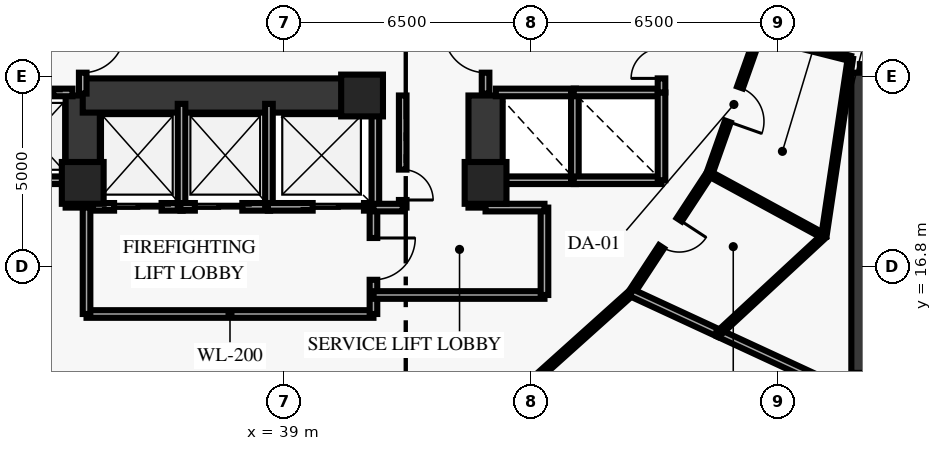
"""IFC4 building model, lengths in metres.
Left out: names, types, materials, properties, quantities, classifications, styles, units other than length and angle.
Written with IfcOpenShell. Run it as: python <this file> out.ifc"""

import sys

from ifc_helpers import new_model, si_unit, direction, frame, frame_2d, origin, origin_2d, place, context, subcontext, project, spatial, rectangle, extrude, element, fill, save


model = new_model("IFC4")
c1 = context("Model", 3, precision=1e-05, world=origin(), true_north=direction((0.0, 1.0)))
c2 = subcontext(c1, "Body", "Model", "MODEL_VIEW")
j1 = project(units=[si_unit("LENGTHUNIT", "METRE"), si_unit("PLANEANGLEUNIT", "RADIAN")], contexts=[c1])
p1 = place(None, origin())
s1 = spatial("IfcSite", under=j1, at=p1, CompositionType="ELEMENT")
p2 = place(p1, origin())
s2 = spatial("IfcBuilding", under=s1, at=p2, CompositionType="ELEMENT")
p3 = place(p2, frame((0.0, 0.0, 6.0)))
s3 = spatial("IfcBuildingStorey", under=s2, at=p3, CompositionType="ELEMENT", Elevation=6.0)
for number, where, z_axis, x_axis in (
    (1, (33.7, 19.0, 0.0), (0.0, 0.0, 1.0), (1.0, 0.0, 0.0)),
    (2, (41.05, 21.3, 0.0), (0.0, 0.0, 1.0), (1.0, 0.0, 0.0)),
    (3, (44.3, 19.0, 0.0), (0.0, 0.0, 1.0), (1.0, 0.0, 0.0)),
):
    element("IfcColumn", number, at=place(p3, frame(where, z_axis=z_axis, x_axis=x_axis)), inside=s3, PredefinedType="PILASTER", context=c2, shape_type="SweptSolid", body=[
        extrude(rectangle(XDim=1.1, YDim=1.1, at=origin_2d()), origin(), (0.0, 0.0, 1.0), 4.7),
    ])
for number, where, z_axis, x_axis in (
    (4, (33.7, 18.35, 0.0), (0.0, 0.0, 1.0), (0.0, 1.0, 0.0)),
    (5, (44.3, 18.35, 0.0), (0.0, 0.0, 1.0), (0.0, 1.0, 0.0)),
):
    element("IfcWall", number, at=place(p3, frame(where, z_axis=z_axis, x_axis=x_axis)), inside=s3, PredefinedType="SHEAR", context=c2, shape_type="SweptSolid", body=[
        extrude(rectangle(XDim=2.95, YDim=0.9, at=frame_2d((1.475, 0.0))), origin(), (0.0, 0.0, 1.0), 4.7),
    ])
p4 = place(p3, frame((33.7, 21.3, 0.0), z_axis=(0.0, 0.0, 1.0), x_axis=(1.0, 0.0, 0.0)))
e6 = element("IfcWall", 6, at=p4, inside=s3, PredefinedType="SHEAR", context=c2, shape_type="SweptSolid", body=[
    extrude(rectangle(XDim=7.55, YDim=0.9, at=frame_2d((3.775, 0.0))), origin(), (0.0, 0.0, 1.0), 4.7),
])
p5 = place(p3, frame((54.15, 14.0, 0.0), z_axis=(0.0, 0.0, 1.0), x_axis=(1.0, 0.0, 0.0)))
e7 = element("IfcWall", 7, at=p5, inside=s3, PredefinedType="SHEAR", context=c2, shape_type="SweptSolid", body=[
    extrude(rectangle(XDim=4.4, YDim=0.45, at=frame_2d((2.2, 0.0))), origin(), (0.0, 0.0, 1.0), 4.7),
])
p6 = place(p3, frame((58.55, 21.9, 0.0), z_axis=(0.0, 0.0, 1.0), x_axis=(-1.0, 0.0, 0.0)))
e8 = element("IfcWall", 8, at=p6, inside=s3, PredefinedType="SHEAR", context=c2, shape_type="SweptSolid", body=[
    extrude(rectangle(XDim=4.4, YDim=0.45, at=frame_2d((2.2, 0.0))), origin(), (0.0, 0.0, 1.0), 4.7),
])
p7 = place(p6, frame((1.625, 0.0, 0.0)))
e9 = element("IfcOpeningElement", 9, at=p7, cuts=e8, PredefinedType="OPENING", context=c2, shape_type="SweptSolid", body=[
    extrude(rectangle(XDim=1.15, YDim=2.15, at=frame_2d((0.575, 1.075))), frame((0.0, 0.235, 0.0), z_axis=(0.0, -1.0, 0.0), x_axis=(1.0, 0.0, 0.0)), (0.0, 0.0, 1.0), 0.47),
])
p8 = place(p3, frame((54.15, 14.0, 0.0), z_axis=(0.0, 0.0, 1.0), x_axis=(0.0, 1.0, 0.0)))
e10 = element("IfcWall", 10, at=p8, inside=s3, PredefinedType="SHEAR", context=c2, shape_type="SweptSolid", body=[
    extrude(rectangle(XDim=7.9, YDim=0.45, at=frame_2d((3.95, 0.0))), origin(), (0.0, 0.0, 1.0), 4.7),
])
p9 = place(p3, frame((31.32, 19.07, 0.0), z_axis=(0.0, 0.0, 1.0), x_axis=(1.0, 0.0, 0.0)))
e11 = element("IfcWall", 11, at=p9, inside=s3, PredefinedType="SOLIDWALL", context=c2, shape_type="SweptSolid", body=[
    extrude(rectangle(XDim=2.11, YDim=0.2, at=frame_2d((1.055, 0.0))), origin(), (0.0, 0.0, 1.0), 4.7),
])
p10 = place(p3, frame((31.32, 21.38, 0.0), z_axis=(0.0, 0.0, 1.0), x_axis=(1.0, 0.0, 0.0)))
e12 = element("IfcWall", 12, at=p10, inside=s3, PredefinedType="SOLIDWALL", context=c2, shape_type="SweptSolid", body=[
    extrude(rectangle(XDim=2.11, YDim=0.2, at=frame_2d((1.055, 0.0))), origin(), (0.0, 0.0, 1.0), 4.7),
])
p11 = place(p10, frame((0.505, 0.0, 0.0)))
e13 = element("IfcOpeningElement", 13, at=p11, cuts=e12, PredefinedType="OPENING", context=c2, shape_type="SweptSolid", body=[
    extrude(rectangle(XDim=1.1, YDim=2.15, at=frame_2d((0.55, 1.075))), frame((0.0, 0.11, 0.0), z_axis=(0.0, -1.0, 0.0), x_axis=(1.0, 0.0, 0.0)), (0.0, 0.0, 1.0), 0.22),
])
for number, where, z_axis, x_axis in (
    (14, (44.57, 19.07, 0.0), (0.0, 0.0, 1.0), (1.0, 0.0, 0.0)),
    (15, (44.57, 21.38, 0.0), (0.0, 0.0, 1.0), (1.0, 0.0, 0.0)),
):
    element("IfcWall", number, at=place(p3, frame(where, z_axis=z_axis, x_axis=x_axis)), inside=s3, PredefinedType="SOLIDWALL", context=c2, shape_type="SweptSolid", body=[
        extrude(rectangle(XDim=2.11, YDim=0.2, at=frame_2d((1.055, 0.0))), origin(), (0.0, 0.0, 1.0), 4.7),
    ])
for number, where, z_axis, x_axis in (
    (16, (46.65, 19.07, 0.0), (0.0, 0.0, 1.0), (0.0, 1.0, 0.0)),
    (17, (46.62, 19.07, 0.0), (0.0, 0.0, 1.0), (1.0, 0.0, 0.0)),
    (18, (46.62, 21.38, 0.0), (0.0, 0.0, 1.0), (1.0, 0.0, 0.0)),
    (19, (48.93, 19.07, 0.0), (0.0, 0.0, 1.0), (0.0, 1.0, 0.0)),
):
    element("IfcWall", number, at=place(p3, frame(where, z_axis=z_axis, x_axis=x_axis)), inside=s3, PredefinedType="SOLIDWALL", context=c2, shape_type="SweptSolid", body=[
        extrude(rectangle(XDim=2.31, YDim=0.2, at=frame_2d((1.155, 0.0))), origin(), (0.0, 0.0, 1.0), 4.7),
    ])
p12 = place(p3, frame((33.97, 18.37, 0.0), z_axis=(0.0, 0.0, 1.0), x_axis=(1.0, 0.0, 0.0)))
e20 = element("IfcWall", 20, at=p12, inside=s3, PredefinedType="SOLIDWALL", context=c2, shape_type="SweptSolid", body=[
    extrude(rectangle(XDim=2.36, YDim=0.2, at=frame_2d((1.18, 0.0))), origin(), (0.0, 0.0, 1.0), 4.7),
])
p13 = place(p12, frame((0.555, 0.0, 0.0)))
e21 = element("IfcOpeningElement", 21, at=p13, cuts=e20, PredefinedType="OPENING", context=c2, shape_type="SweptSolid", body=[
    extrude(rectangle(XDim=1.25, YDim=2.2, at=frame_2d((0.625, 1.1))), frame((0.0, 0.11, 0.0), z_axis=(0.0, -1.0, 0.0), x_axis=(1.0, 0.0, 0.0)), (0.0, 0.0, 1.0), 0.22),
])
p14 = place(p3, frame((36.3, 18.37, 0.0), z_axis=(0.0, 0.0, 1.0), x_axis=(0.0, 1.0, 0.0)))
e22 = element("IfcWall", 22, at=p14, inside=s3, PredefinedType="SOLIDWALL", context=c2, shape_type="SweptSolid", body=[
    extrude(rectangle(XDim=2.71, YDim=0.2, at=frame_2d((1.355, 0.0))), origin(), (0.0, 0.0, 1.0), 4.7),
])
p15 = place(p3, frame((36.27, 18.37, 0.0), z_axis=(0.0, 0.0, 1.0), x_axis=(1.0, 0.0, 0.0)))
e23 = element("IfcWall", 23, at=p15, inside=s3, PredefinedType="SOLIDWALL", context=c2, shape_type="SweptSolid", body=[
    extrude(rectangle(XDim=2.36, YDim=0.2, at=frame_2d((1.18, 0.0))), origin(), (0.0, 0.0, 1.0), 4.7),
])
p16 = place(p15, frame((0.38, 0.0, 0.0)))
e24 = element("IfcOpeningElement", 24, at=p16, cuts=e23, PredefinedType="OPENING", context=c2, shape_type="SweptSolid", body=[
    extrude(rectangle(XDim=1.25, YDim=2.2, at=frame_2d((0.625, 1.1))), frame((0.0, 0.11, 0.0), z_axis=(0.0, -1.0, 0.0), x_axis=(1.0, 0.0, 0.0)), (0.0, 0.0, 1.0), 0.22),
])
p17 = place(p3, frame((38.6, 18.37, 0.0), z_axis=(0.0, 0.0, 1.0), x_axis=(0.0, 1.0, 0.0)))
e25 = element("IfcWall", 25, at=p17, inside=s3, PredefinedType="SOLIDWALL", context=c2, shape_type="SweptSolid", body=[
    extrude(rectangle(XDim=2.71, YDim=0.2, at=frame_2d((1.355, 0.0))), origin(), (0.0, 0.0, 1.0), 4.7),
])
p18 = place(p3, frame((38.57, 18.37, 0.0), z_axis=(0.0, 0.0, 1.0), x_axis=(1.0, 0.0, 0.0)))
e26 = element("IfcWall", 26, at=p18, inside=s3, PredefinedType="SOLIDWALL", context=c2, shape_type="SweptSolid", body=[
    extrude(rectangle(XDim=2.83, YDim=0.2, at=frame_2d((1.415, 0.0))), origin(), (0.0, 0.0, 1.0), 4.7),
])
p19 = place(p18, frame((1.18, 0.0, 0.0)))
e27 = element("IfcOpeningElement", 27, at=p19, cuts=e26, PredefinedType="OPENING", context=c2, shape_type="SweptSolid", body=[
    extrude(rectangle(XDim=1.35, YDim=2.18, at=frame_2d((0.675, 1.09))), frame((0.0, 0.11, 0.0), z_axis=(0.0, -1.0, 0.0), x_axis=(1.0, 0.0, 0.0)), (0.0, 0.0, 1.0), 0.22),
])
p20 = place(p3, frame((41.4, 18.37, 0.0), z_axis=(0.0, 0.0, 1.0), x_axis=(0.0, 1.0, 0.0)))
e28 = element("IfcWall", 28, at=p20, inside=s3, PredefinedType="SOLIDWALL", context=c2, shape_type="SweptSolid", body=[
    extrude(rectangle(XDim=2.71, YDim=0.2, at=frame_2d((1.355, 0.0))), origin(), (0.0, 0.0, 1.0), 4.7),
])
p21 = place(p3, frame((48.93, 21.38, 0.0), z_axis=(0.0, 0.0, 1.0), x_axis=(0.0, 1.0, 0.0)))
e29 = element("IfcWall", 29, at=p21, inside=s3, PredefinedType="SOLIDWALL", context=c2, shape_type="SweptSolid", body=[
    extrude(rectangle(XDim=2.34, YDim=0.2, at=frame_2d((1.17, 0.0))), origin(), (0.0, 0.0, 1.0), 4.7),
])
p22 = place(p21, frame((0.37, 0.0, 0.0)))
e30 = element("IfcOpeningElement", 30, at=p22, cuts=e29, PredefinedType="OPENING", context=c2, shape_type="SweptSolid", body=[
    extrude(rectangle(XDim=1.6, YDim=2.2, at=frame_2d((0.8, 1.1))), frame((0.0, 0.11, 0.0), z_axis=(0.0, -1.0, 0.0), x_axis=(1.0, 0.0, 0.0)), (0.0, 0.0, 1.0), 0.22),
])
p23 = place(p3, frame((33.7, 21.35, 0.0), z_axis=(0.0, 0.0, 1.0), x_axis=(0.0, 1.0, 0.0)))
e31 = element("IfcWall", 31, at=p23, inside=s3, PredefinedType="SOLIDWALL", context=c2, shape_type="SweptSolid", body=[
    extrude(rectangle(XDim=2.1, YDim=0.2, at=frame_2d((1.05, 0.0))), origin(), (0.0, 0.0, 1.0), 3.92),
])
p24 = place(p23, frame((0.55, 0.0, 0.0)))
e32 = element("IfcOpeningElement", 32, at=p24, cuts=e31, PredefinedType="OPENING", context=c2, shape_type="SweptSolid", body=[
    extrude(rectangle(XDim=1.1, YDim=2.15, at=frame_2d((0.55, 1.075))), frame((0.0, 0.11, 0.0), z_axis=(0.0, -1.0, 0.0), x_axis=(1.0, 0.0, 0.0)), (0.0, 0.0, 1.0), 0.22),
])
p25 = place(p3, frame((44.3, 21.35, 0.0), z_axis=(0.0, 0.0, 1.0), x_axis=(0.0, 1.0, 0.0)))
e33 = element("IfcWall", 33, at=p25, inside=s3, PredefinedType="SOLIDWALL", context=c2, shape_type="SweptSolid", body=[
    extrude(rectangle(XDim=2.1, YDim=0.2, at=frame_2d((1.05, 0.0))), origin(), (0.0, 0.0, 1.0), 3.92),
])
p26 = place(p25, frame((0.55, 0.0, 0.0)))
e34 = element("IfcOpeningElement", 34, at=p26, cuts=e33, PredefinedType="OPENING", context=c2, shape_type="SweptSolid", body=[
    extrude(rectangle(XDim=1.1, YDim=2.15, at=frame_2d((0.55, 1.075))), frame((0.0, 0.11, 0.0), z_axis=(0.0, -1.0, 0.0), x_axis=(1.0, 0.0, 0.0)), (0.0, 0.0, 1.0), 0.22),
])
p27 = place(p3, frame((33.8, 15.55, 0.0), z_axis=(0.0, 0.0, 1.0), x_axis=(1.0, 0.0, 0.0)))
e35 = element("IfcWall", 35, at=p27, inside=s3, PredefinedType="SOLIDWALL", context=c2, shape_type="SweptSolid", body=[
    extrude(rectangle(XDim=7.55, YDim=0.2, at=frame_2d((3.775, 0.0))), origin(), (0.0, 0.0, 1.0), 4.7),
])
p28 = place(p3, frame((33.8, 15.55, 0.0), z_axis=(0.0, 0.0, 1.0), x_axis=(0.0, 1.0, 0.0)))
e36 = element("IfcWall", 36, at=p28, inside=s3, PredefinedType="SOLIDWALL", context=c2, shape_type="SweptSolid", body=[
    extrude(rectangle(XDim=2.8, YDim=0.2, at=frame_2d((1.4, 0.0))), origin(), (0.0, 0.0, 1.0), 4.7),
])
p29 = place(p3, frame((41.35, 15.55, 0.0), z_axis=(0.0, 0.0, 1.0), x_axis=(0.0, 1.0, 0.0)))
e37 = element("IfcWall", 37, at=p29, inside=s3, PredefinedType="SOLIDWALL", context=c2, shape_type="SweptSolid", body=[
    extrude(rectangle(XDim=2.8, YDim=0.2, at=frame_2d((1.4, 0.0))), origin(), (0.0, 0.0, 1.0), 4.7),
])
p30 = place(p29, frame((0.9, 0.0, 0.0)))
e38 = element("IfcOpeningElement", 38, at=p30, cuts=e37, PredefinedType="OPENING", context=c2, shape_type="SweptSolid", body=[
    extrude(rectangle(XDim=1.1, YDim=2.15, at=frame_2d((0.55, 1.075))), frame((0.0, 0.11, 0.0), z_axis=(0.0, -1.0, 0.0), x_axis=(1.0, 0.0, 0.0)), (0.0, 0.0, 1.0), 0.22),
])
p31 = place(p3, frame((41.35, 16.05, 0.0), z_axis=(0.0, 0.0, 1.0), x_axis=(1.0, 0.0, 0.0)))
e39 = element("IfcWall", 39, at=p31, inside=s3, PredefinedType="SOLIDWALL", context=c2, shape_type="SweptSolid", body=[
    extrude(rectangle(XDim=4.5, YDim=0.2, at=frame_2d((2.25, 0.0))), origin(), (0.0, 0.0, 1.0), 4.7),
])
p32 = place(p3, frame((45.85, 16.05, 0.0), z_axis=(0.0, 0.0, 1.0), x_axis=(0.0, 1.0, 0.0)))
e40 = element("IfcWall", 40, at=p32, inside=s3, PredefinedType="SOLIDWALL", context=c2, shape_type="SweptSolid", body=[
    extrude(rectangle(XDim=2.3, YDim=0.2, at=frame_2d((1.15, 0.0))), origin(), (0.0, 0.0, 1.0), 4.7),
])
p33 = place(p3, frame((44.3, 18.35, 0.0), z_axis=(0.0, 0.0, 1.0), x_axis=(1.0, 0.0, 0.0)))
e41 = element("IfcWall", 41, at=p33, inside=s3, PredefinedType="SOLIDWALL", context=c2, shape_type="SweptSolid", body=[
    extrude(rectangle(XDim=1.55, YDim=0.2, at=frame_2d((0.775, 0.0))), origin(), (0.0, 0.0, 1.0), 4.7),
])
p34 = place(p3, frame((42.12, 18.35, 0.0), z_axis=(0.0, 0.0, 1.0), x_axis=(0.0, 1.0, 0.0)))
e42 = element("IfcWall", 42, at=p34, inside=s3, PredefinedType="SOLIDWALL", context=c2, shape_type="SweptSolid", body=[
    extrude(rectangle(XDim=2.95, YDim=0.2, at=frame_2d((1.475, 0.0))), origin(), (0.0, 0.0, 1.0), 4.7),
])
p35 = place(p34, frame((0.2, 0.0, 0.0)))
e43 = element("IfcOpeningElement", 43, at=p35, cuts=e42, PredefinedType="OPENING", context=c2, shape_type="SweptSolid", body=[
    extrude(rectangle(XDim=0.8, YDim=2.05, at=frame_2d((0.4, 1.025))), frame((0.0, 0.11, 0.0), z_axis=(0.0, -1.0, 0.0), x_axis=(1.0, 0.0, 0.0)), (0.0, 0.0, 1.0), 0.22),
])
p36 = place(p3, frame((41.35, 18.35, 0.0), z_axis=(0.0, 0.0, 1.0), x_axis=(1.0, 0.0, 0.0)))
e44 = element("IfcWall", 44, at=p36, inside=s3, PredefinedType="SOLIDWALL", context=c2, shape_type="SweptSolid", body=[
    extrude(rectangle(XDim=0.77, YDim=0.2, at=frame_2d((0.385, 0.0))), origin(), (0.0, 0.0, 1.0), 4.7),
])
p37 = place(p3, frame((45.46, 13.706, 0.0), z_axis=(0.0, 0.0, 1.0), x_axis=(0.744066617248, 0.668105432621, 0.0)))
e45 = element("IfcWall", 45, at=p37, inside=s3, PredefinedType="PARTITIONING", context=c2, shape_type="SweptSolid", body=[
    extrude(rectangle(XDim=3.596, YDim=0.16, at=frame_2d((1.798, 0.0))), origin(), (0.0, 0.0, 1.0), 4.7),
])
p38 = place(p3, frame((50.189, 19.24, 0.0), z_axis=(0.0, 0.0, 1.0), x_axis=(-0.548318837904, -0.836269365694, 0.0)))
e46 = element("IfcWall", 46, at=p38, inside=s3, PredefinedType="PARTITIONING", context=c2, shape_type="SweptSolid", body=[
    extrude(rectangle(XDim=3.744, YDim=0.16, at=frame_2d((1.872, 0.0))), origin(), (0.0, 0.0, 1.0), 4.7),
])
p39 = place(p38, frame((1.447, 0.0, 0.0)))
e47 = element("IfcOpeningElement", 47, at=p39, cuts=e46, PredefinedType="OPENING", context=c2, shape_type="SweptSolid", body=[
    extrude(rectangle(XDim=0.85, YDim=2.1, at=frame_2d((0.425, 1.05))), frame((0.0, 0.09, 0.0), z_axis=(0.0, -1.0, 0.0), x_axis=(1.0, 0.0, 0.0)), (0.0, 0.0, 1.0), 0.18),
])
p40 = place(p3, frame((51.48, 22.887, 0.0), z_axis=(0.0, 0.0, 1.0), x_axis=(-0.333704620558, -0.942677689467, 0.0)))
e48 = element("IfcWall", 48, at=p40, inside=s3, PredefinedType="PARTITIONING", context=c2, shape_type="SweptSolid", body=[
    extrude(rectangle(XDim=3.869, YDim=0.16, at=frame_2d((1.934, 0.0))), origin(), (0.0, 0.0, 1.0), 4.7),
])
p41 = place(p40, frame((1.459, 0.0, 0.0)))
e49 = element("IfcOpeningElement", 49, at=p41, cuts=e48, PredefinedType="OPENING", context=c2, shape_type="SweptSolid", body=[
    extrude(rectangle(XDim=0.95, YDim=2.1, at=frame_2d((0.475, 1.05))), frame((0.0, 0.09, 0.0), z_axis=(0.0, -1.0, 0.0), x_axis=(1.0, 0.0, 0.0)), (0.0, 0.0, 1.0), 0.18),
])
p42 = place(p3, frame((48.136, 16.109, 0.0), z_axis=(0.0, 0.0, 1.0), x_axis=(0.907508335547, -0.420034071133, 0.0)))
e50 = element("IfcWall", 50, at=p42, inside=s3, PredefinedType="PARTITIONING", context=c2, shape_type="SweptSolid", body=[
    extrude(rectangle(XDim=2.538, YDim=0.2, at=frame_2d((1.269, 0.0))), origin(), (0.0, 0.0, 1.0), 4.7),
])
p43 = place(p3, frame((50.439, 15.043, 0.0), z_axis=(0.0, 0.0, 1.0), x_axis=(0.907524397356, -0.419999366908, 0.0)))
e51 = element("IfcWall", 51, at=p43, inside=s3, PredefinedType="PARTITIONING", context=c2, shape_type="SweptSolid", body=[
    extrude(rectangle(XDim=7.614, YDim=0.2, at=frame_2d((3.807, 0.0))), origin(), (0.0, 0.0, 1.0), 4.7),
])
p44 = place(p3, frame((50.189, 19.24, 0.0), z_axis=(0.0, 0.0, 1.0), x_axis=(0.878392721738, -0.477939563541, 0.0)))
e52 = element("IfcWall", 52, at=p44, inside=s3, PredefinedType="PARTITIONING", context=c2, shape_type="SweptSolid", body=[
    extrude(rectangle(XDim=3.431, YDim=0.14, at=frame_2d((1.716, 0.0))), origin(), (0.0, 0.0, 1.0), 4.7),
])
p45 = place(p3, frame((51.48, 22.887, 0.0), z_axis=(0.0, 0.0, 1.0), x_axis=(0.969564374521, -0.244836524357, 0.0)))
e53 = element("IfcWall", 53, at=p45, inside=s3, PredefinedType="PARTITIONING", context=c2, shape_type="SweptSolid", body=[
    extrude(rectangle(XDim=2.496, YDim=0.14, at=frame_2d((1.248, 0.0))), origin(), (0.0, 0.0, 1.0), 4.7),
])
p46 = place(p3, frame((50.439, 15.043, 0.0), z_axis=(0.0, 0.0, 1.0), x_axis=(0.734032370371, 0.679114481695, 0.0)))
e54 = element("IfcWall", 54, at=p46, inside=s3, PredefinedType="PARTITIONING", context=c2, shape_type="SweptSolid", body=[
    extrude(rectangle(XDim=3.765, YDim=0.14, at=frame_2d((1.883, 0.0))), origin(), (0.0, 0.0, 1.0), 4.7),
])
p47 = place(p3, frame((53.203, 17.6, 0.0), z_axis=(0.0, 0.0, 1.0), x_axis=(0.147441370436, 0.989070797407, 0.0)))
e55 = element("IfcWall", 55, at=p47, inside=s3, PredefinedType="PARTITIONING", context=c2, shape_type="SweptSolid", body=[
    extrude(rectangle(XDim=4.728, YDim=0.14, at=frame_2d((2.364, 0.0))), origin(), (0.0, 0.0, 1.0), 4.7),
])
p48 = place(p11, origin())
e56 = element("IfcDoor", 56, at=p48, inside=s3, OperationType="DOUBLE_DOOR_SLIDING", PredefinedType="DOOR", context=c2, shape_type="SweptSolid", body=[
    extrude(rectangle(XDim=1.1, YDim=2.15, at=frame_2d((0.55, 1.075))), frame((0.0, 0.025, 0.0), z_axis=(0.0, -1.0, 0.0), x_axis=(1.0, 0.0, 0.0)), (0.0, 0.0, 1.0), 0.05),
])
fill(e13, e56)
p49 = place(p13, origin())
e57 = element("IfcDoor", 57, at=p49, inside=s3, OperationType="DOUBLE_DOOR_SLIDING", PredefinedType="DOOR", context=c2, shape_type="SweptSolid", body=[
    extrude(rectangle(XDim=1.25, YDim=2.2, at=frame_2d((0.625, 1.1))), frame((0.0, 0.025, 0.0), z_axis=(0.0, -1.0, 0.0), x_axis=(1.0, 0.0, 0.0)), (0.0, 0.0, 1.0), 0.05),
])
fill(e21, e57)
p50 = place(p16, origin())
e58 = element("IfcDoor", 58, at=p50, inside=s3, OperationType="DOUBLE_DOOR_SLIDING", PredefinedType="DOOR", context=c2, shape_type="SweptSolid", body=[
    extrude(rectangle(XDim=1.25, YDim=2.2, at=frame_2d((0.625, 1.1))), frame((0.0, 0.025, 0.0), z_axis=(0.0, -1.0, 0.0), x_axis=(1.0, 0.0, 0.0)), (0.0, 0.0, 1.0), 0.05),
])
fill(e24, e58)
p51 = place(p19, origin())
e59 = element("IfcDoor", 59, at=p51, inside=s3, OperationType="DOUBLE_DOOR_SLIDING", PredefinedType="DOOR", context=c2, shape_type="SweptSolid", body=[
    extrude(rectangle(XDim=1.35, YDim=2.18, at=frame_2d((0.675, 1.09))), frame((0.0, 0.025, 0.0), z_axis=(0.0, -1.0, 0.0), x_axis=(1.0, 0.0, 0.0)), (0.0, 0.0, 1.0), 0.05),
])
fill(e27, e59)
p52 = place(p22, origin())
e60 = element("IfcDoor", 60, at=p52, inside=s3, OperationType="DOUBLE_DOOR_SINGLE_SWING", PredefinedType="DOOR", context=c2, shape_type="SweptSolid", body=[
    extrude(rectangle(XDim=1.6, YDim=2.2, at=frame_2d((0.8, 1.1))), frame((0.0, 0.025, 0.0), z_axis=(0.0, -1.0, 0.0), x_axis=(1.0, 0.0, 0.0)), (0.0, 0.0, 1.0), 0.05),
])
fill(e30, e60)
p53 = place(p24, origin())
e61 = element("IfcDoor", 61, at=p53, inside=s3, OperationType="SINGLE_SWING_RIGHT", PredefinedType="DOOR", context=c2, shape_type="SweptSolid", body=[
    extrude(rectangle(XDim=1.1, YDim=2.15, at=frame_2d((0.55, 1.075))), frame((0.0, 0.025, 0.0), z_axis=(0.0, -1.0, 0.0), x_axis=(1.0, 0.0, 0.0)), (0.0, 0.0, 1.0), 0.05),
])
fill(e32, e61)
p54 = place(p26, origin())
e62 = element("IfcDoor", 62, at=p54, inside=s3, OperationType="SINGLE_SWING_RIGHT", PredefinedType="DOOR", context=c2, shape_type="SweptSolid", body=[
    extrude(rectangle(XDim=1.1, YDim=2.15, at=frame_2d((0.55, 1.075))), frame((0.0, 0.025, 0.0), z_axis=(0.0, -1.0, 0.0), x_axis=(1.0, 0.0, 0.0)), (0.0, 0.0, 1.0), 0.05),
])
fill(e34, e62)
p55 = place(p30, origin())
e63 = element("IfcDoor", 63, at=p55, inside=s3, OperationType="SINGLE_SWING_RIGHT", PredefinedType="DOOR", context=c2, shape_type="SweptSolid", body=[
    extrude(rectangle(XDim=1.1, YDim=2.15, at=frame_2d((0.55, 1.075))), frame((0.0, 0.025, 0.0), z_axis=(0.0, -1.0, 0.0), x_axis=(1.0, 0.0, 0.0)), (0.0, 0.0, 1.0), 0.05),
])
fill(e38, e63)
p56 = place(p35, origin())
e64 = element("IfcDoor", 64, at=p56, inside=s3, OperationType="SINGLE_SWING_LEFT", PredefinedType="DOOR", context=c2, shape_type="SweptSolid", body=[
    extrude(rectangle(XDim=0.8, YDim=2.05, at=frame_2d((0.4, 1.025))), frame((0.0, 0.025, 0.0), z_axis=(0.0, -1.0, 0.0), x_axis=(1.0, 0.0, 0.0)), (0.0, 0.0, 1.0), 0.05),
])
fill(e43, e64)
p57 = place(p39, origin())
e65 = element("IfcDoor", 65, at=p57, inside=s3, OperationType="SINGLE_SWING_LEFT", PredefinedType="DOOR", context=c2, shape_type="SweptSolid", body=[
    extrude(rectangle(XDim=0.85, YDim=2.1, at=frame_2d((0.425, 1.05))), frame((0.0, 0.025, 0.0), z_axis=(0.0, -1.0, 0.0), x_axis=(1.0, 0.0, 0.0)), (0.0, 0.0, 1.0), 0.05),
])
fill(e47, e65)
p58 = place(p41, origin())
e66 = element("IfcDoor", 66, at=p58, inside=s3, OperationType="SINGLE_SWING_RIGHT", PredefinedType="DOOR", context=c2, shape_type="SweptSolid", body=[
    extrude(rectangle(XDim=0.95, YDim=2.1, at=frame_2d((0.475, 1.05))), frame((0.0, 0.025, 0.0), z_axis=(0.0, -1.0, 0.0), x_axis=(1.0, 0.0, 0.0)), (0.0, 0.0, 1.0), 0.05),
])
fill(e49, e66)
save(model, sys.argv[1])
